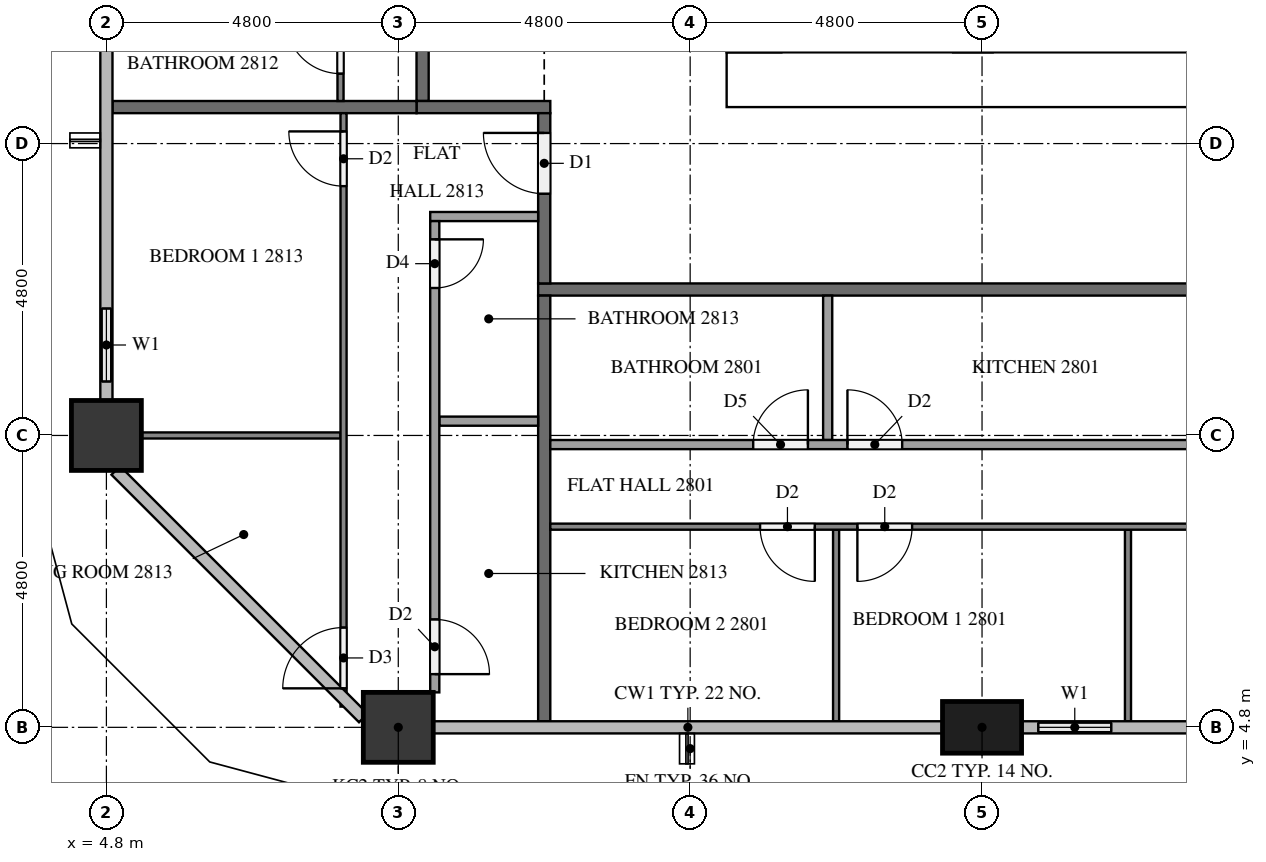
"""IFC4 building model, lengths in metres.
Left out: names, types, materials, properties, quantities, classifications, styles, units other than length and angle.
Written with IfcOpenShell. Run it as: python <this file> out.ifc"""

import sys

from ifc_helpers import new_model, si_unit, direction, frame, frame_2d, origin, origin_2d, place, context, subcontext, project, spatial, rectangle, extrude, element, fill, save


model = new_model("IFC4")
c1 = context("Model", 3, precision=1e-05, world=origin(), true_north=direction((0.0, 1.0)))
c2 = subcontext(c1, "Body", "Model", "MODEL_VIEW")
j1 = project(units=[si_unit("LENGTHUNIT", "METRE"), si_unit("PLANEANGLEUNIT", "RADIAN")], contexts=[c1])
p1 = place(None, origin())
s1 = spatial("IfcSite", under=j1, at=p1, CompositionType="ELEMENT")
p2 = place(p1, origin())
s2 = spatial("IfcBuilding", under=s1, at=p2, CompositionType="ELEMENT")
p3 = place(p2, frame((0.0, 0.0, 110.2)))
s3 = spatial("IfcBuildingStorey", under=s2, at=p3, CompositionType="ELEMENT", Elevation=110.2)
p4 = place(p3, frame((15.0, 15.45, 0.0), z_axis=(0.0, 0.0, 1.0), x_axis=(1.0, 0.0, 0.0)))
e1 = element("IfcWall", 1, at=p4, inside=s3, PredefinedType="SHEAR", context=c2, shape_type="SweptSolid", body=[
    extrude(rectangle(XDim=32.4, YDim=0.9, at=frame_2d((16.2, 0.0))), origin(), (0.0, 0.0, 1.0), 3.1),
])
p5 = place(p4, frame((15.3, 0.0, 0.0)))
e2 = element("IfcOpeningElement", 2, at=p5, cuts=e1, PredefinedType="OPENING", context=c2, shape_type="SweptSolid", body=[
    extrude(rectangle(XDim=1.8, YDim=2.1, at=frame_2d((0.9, 1.05))), frame((0.0, 0.46, 0.0), z_axis=(0.0, -1.0, 0.0), x_axis=(1.0, 0.0, 0.0)), (0.0, 0.0, 1.0), 0.92),
])
p6 = place(p3, frame((9.6, 4.8, 0.0), z_axis=(0.0, 0.0, 1.0), x_axis=(1.0, 0.0, 0.0)))
e3 = element("IfcColumn", 3, at=p6, inside=s3, PredefinedType="COLUMN", context=c2, shape_type="SweptSolid", body=[
    extrude(rectangle(XDim=1.15, YDim=1.15, at=origin_2d()), origin(), (0.0, 0.0, 1.0), 3.1),
])
p7 = place(p3, frame((19.2, 4.8, 0.0), z_axis=(0.0, 0.0, 1.0), x_axis=(1.0, 0.0, 0.0)))
e4 = element("IfcColumn", 4, at=p7, inside=s3, PredefinedType="COLUMN", context=c2, shape_type="SweptSolid", body=[
    extrude(rectangle(XDim=1.3, YDim=0.85, at=origin_2d()), origin(), (0.0, 0.0, 1.0), 3.1),
])
p8 = place(p3, frame((4.8, 9.6, 0.0), z_axis=(0.0, 0.0, 1.0), x_axis=(1.0, 0.0, 0.0)))
e5 = element("IfcColumn", 5, at=p8, inside=s3, PredefinedType="COLUMN", context=c2, shape_type="SweptSolid", body=[
    extrude(rectangle(XDim=1.15, YDim=1.15, at=origin_2d()), origin(), (0.0, 0.0, 1.0), 3.1),
])
p9 = place(p3, frame((19.85, 4.8, 0.0), z_axis=(0.0, 0.0, 1.0), x_axis=(1.0, 0.0, 0.0)))
e6 = element("IfcWall", 6, at=p9, inside=s3, PredefinedType="SOLIDWALL", context=c2, shape_type="SweptSolid", body=[
    extrude(rectangle(XDim=1.75, YDim=0.15, at=frame_2d((0.875, 0.0))), origin(), (0.0, 0.0, 1.0), 3.1),
])
p10 = place(p9, frame((0.275, 0.0, 0.9)))
e7 = element("IfcOpeningElement", 7, at=p10, cuts=e6, PredefinedType="OPENING", context=c2, shape_type="SweptSolid", body=[
    extrude(rectangle(XDim=1.2, YDim=1.4, at=frame_2d((0.6, 0.7))), frame((0.0, 0.085, 0.0), z_axis=(0.0, -1.0, 0.0), x_axis=(1.0, 0.0, 0.0)), (0.0, 0.0, 1.0), 0.17),
])
p11 = place(p3, frame((4.8, 12.0, 0.0), z_axis=(0.0, 0.0, 1.0), x_axis=(0.0, -1.0, 0.0)))
e8 = element("IfcWall", 8, at=p11, inside=s3, PredefinedType="SOLIDWALL", context=c2, shape_type="SweptSolid", body=[
    extrude(rectangle(XDim=1.825, YDim=0.15, at=frame_2d((0.913, 0.0))), origin(), (0.0, 0.0, 1.0), 3.1),
])
p12 = place(p11, frame((0.312, 0.0, 0.9)))
e9 = element("IfcOpeningElement", 9, at=p12, cuts=e8, PredefinedType="OPENING", context=c2, shape_type="SweptSolid", body=[
    extrude(rectangle(XDim=1.2, YDim=1.4, at=frame_2d((0.6, 0.7))), frame((0.0, 0.085, 0.0), z_axis=(0.0, -1.0, 0.0), x_axis=(1.0, 0.0, 0.0)), (0.0, 0.0, 1.0), 0.17),
])
p13 = place(p3, frame((50.5, 12.0, 0.0), z_axis=(0.0, 0.0, 1.0), x_axis=(-1.0, 0.0, 0.0)))
e10 = element("IfcWall", 10, at=p13, inside=s3, PredefinedType="PARTITIONING", context=c2, shape_type="SweptSolid", body=[
    extrude(rectangle(XDim=38.6, YDim=0.2, at=frame_2d((19.3, 0.0))), origin(), (0.0, 0.0, 1.0), 3.1),
])
p14 = place(p13, frame((22.125, 0.0, 0.0)))
e11 = element("IfcOpeningElement", 11, at=p14, cuts=e10, PredefinedType="OPENING", context=c2, shape_type="SweptSolid", body=[
    extrude(rectangle(XDim=1.0, YDim=2.1, at=frame_2d((0.5, 1.05))), frame((0.0, 0.11, 0.0), z_axis=(0.0, -1.0, 0.0), x_axis=(1.0, 0.0, 0.0)), (0.0, 0.0, 1.0), 0.22),
])
p15 = place(p13, frame((20.275, 0.0, 0.0)))
e12 = element("IfcOpeningElement", 12, at=p15, cuts=e10, PredefinedType="OPENING", context=c2, shape_type="SweptSolid", body=[
    extrude(rectangle(XDim=1.0, YDim=2.1, at=frame_2d((0.5, 1.05))), frame((0.0, 0.11, 0.0), z_axis=(0.0, -1.0, 0.0), x_axis=(1.0, 0.0, 0.0)), (0.0, 0.0, 1.0), 0.22),
])
p16 = place(p13, frame((0.525, 0.0, 0.0)))
e13 = element("IfcOpeningElement", 13, at=p16, cuts=e10, PredefinedType="OPENING", context=c2, shape_type="SweptSolid", body=[
    extrude(rectangle(XDim=1.0, YDim=2.1, at=frame_2d((0.5, 1.05))), frame((0.0, 0.11, 0.0), z_axis=(0.0, -1.0, 0.0), x_axis=(1.0, 0.0, 0.0)), (0.0, 0.0, 1.0), 0.22),
])
p17 = place(p3, frame((10.0, 15.1, 0.0), z_axis=(0.0, 0.0, 1.0), x_axis=(0.0, 1.0, 0.0)))
e14 = element("IfcWall", 14, at=p17, inside=s3, PredefinedType="PARTITIONING", context=c2, shape_type="SweptSolid", body=[
    extrude(rectangle(XDim=22.6, YDim=0.2, at=frame_2d((11.3, 0.0))), origin(), (0.0, 0.0, 1.0), 3.1),
])
p18 = place(p17, frame((21.275, 0.0, 0.0)))
e15 = element("IfcOpeningElement", 15, at=p18, cuts=e14, PredefinedType="OPENING", context=c2, shape_type="SweptSolid", body=[
    extrude(rectangle(XDim=1.0, YDim=2.1, at=frame_2d((0.5, 1.05))), frame((0.0, 0.11, 0.0), z_axis=(0.0, -1.0, 0.0), x_axis=(1.0, 0.0, 0.0)), (0.0, 0.0, 1.0), 0.22),
])
p19 = place(p3, frame((9.9, 15.0, 0.0), z_axis=(0.0, 0.0, 1.0), x_axis=(1.0, 0.0, 0.0)))
e16 = element("IfcWall", 16, at=p19, inside=s3, PredefinedType="PARTITIONING", context=c2, shape_type="SweptSolid", body=[
    extrude(rectangle(XDim=2.2, YDim=0.2, at=frame_2d((1.1, 0.0))), origin(), (0.0, 0.0, 1.0), 3.1),
])
p20 = place(p3, frame((12.0, 12.1, 0.0), z_axis=(0.0, 0.0, 1.0), x_axis=(0.0, 1.0, 0.0)))
e17 = element("IfcWall", 17, at=p20, inside=s3, PredefinedType="PARTITIONING", context=c2, shape_type="SweptSolid", body=[
    extrude(rectangle(XDim=2.8, YDim=0.2, at=frame_2d((1.4, 0.0))), origin(), (0.0, 0.0, 1.0), 3.1),
])
p21 = place(p20, frame((1.475, 0.0, 0.0)))
e18 = element("IfcOpeningElement", 18, at=p21, cuts=e17, PredefinedType="OPENING", context=c2, shape_type="SweptSolid", body=[
    extrude(rectangle(XDim=1.0, YDim=2.1, at=frame_2d((0.5, 1.05))), frame((0.0, 0.11, 0.0), z_axis=(0.0, -1.0, 0.0), x_axis=(1.0, 0.0, 0.0)), (0.0, 0.0, 1.0), 0.22),
])
p22 = place(p3, frame((12.0, 4.9, 0.0), z_axis=(0.0, 0.0, 1.0), x_axis=(0.0, 1.0, 0.0)))
e19 = element("IfcWall", 19, at=p22, inside=s3, PredefinedType="PARTITIONING", context=c2, shape_type="SweptSolid", body=[
    extrude(rectangle(XDim=7.0, YDim=0.2, at=frame_2d((3.5, 0.0))), origin(), (0.0, 0.0, 1.0), 3.1),
])
p23 = place(p3, frame((4.9, 15.0, 0.0), z_axis=(0.0, 0.0, 1.0), x_axis=(1.0, 0.0, 0.0)))
e20 = element("IfcWall", 20, at=p23, inside=s3, PredefinedType="PARTITIONING", context=c2, shape_type="SweptSolid", body=[
    extrude(rectangle(XDim=5.0, YDim=0.2, at=frame_2d((2.5, 0.0))), origin(), (0.0, 0.0, 1.0), 3.1),
])
for number, where, z_axis, x_axis in (
    (21, (21.6, 8.05, 0.0), (0.0, 0.0, 1.0), (0.0, -1.0, 0.0)),
    (22, (16.8, 8.05, 0.0), (0.0, 0.0, 1.0), (0.0, -1.0, 0.0)),
):
    element("IfcWall", number, at=place(p3, frame(where, z_axis=z_axis, x_axis=x_axis)), inside=s3, PredefinedType="PARTITIONING", context=c2, shape_type="SweptSolid", body=[
        extrude(rectangle(XDim=3.15, YDim=0.1, at=frame_2d((1.575, 0.0))), origin(), (0.0, 0.0, 1.0), 3.1),
    ])
p24 = place(p3, frame((28.7, 8.1, 0.0), z_axis=(0.0, 0.0, 1.0), x_axis=(-1.0, 0.0, 0.0)))
e23 = element("IfcWall", 23, at=p24, inside=s3, PredefinedType="PARTITIONING", context=c2, shape_type="SweptSolid", body=[
    extrude(rectangle(XDim=16.6, YDim=0.1, at=frame_2d((8.3, 0.0))), origin(), (0.0, 0.0, 1.0), 3.1),
])
p25 = place(p24, frame((0.3, 0.0, 0.0)))
e24 = element("IfcOpeningElement", 24, at=p25, cuts=e23, PredefinedType="OPENING", context=c2, shape_type="SweptSolid", body=[
    extrude(rectangle(XDim=1.0, YDim=2.1, at=frame_2d((0.5, 1.05))), frame((0.0, 0.06, 0.0), z_axis=(0.0, -1.0, 0.0), x_axis=(1.0, 0.0, 0.0)), (0.0, 0.0, 1.0), 0.12),
])
p26 = place(p24, frame((10.65, 0.0, 0.0)))
e25 = element("IfcOpeningElement", 25, at=p26, cuts=e23, PredefinedType="OPENING", context=c2, shape_type="SweptSolid", body=[
    extrude(rectangle(XDim=0.9, YDim=2.1, at=frame_2d((0.45, 1.05))), frame((0.0, 0.06, 0.0), z_axis=(0.0, -1.0, 0.0), x_axis=(1.0, 0.0, 0.0)), (0.0, 0.0, 1.0), 0.12),
])
p27 = place(p24, frame((12.25, 0.0, 0.0)))
e26 = element("IfcOpeningElement", 26, at=p27, cuts=e23, PredefinedType="OPENING", context=c2, shape_type="SweptSolid", body=[
    extrude(rectangle(XDim=0.9, YDim=2.1, at=frame_2d((0.45, 1.05))), frame((0.0, 0.06, 0.0), z_axis=(0.0, -1.0, 0.0), x_axis=(1.0, 0.0, 0.0)), (0.0, 0.0, 1.0), 0.12),
])
p28 = place(p3, frame((16.662, 11.9, 0.0), z_axis=(0.0, 0.0, 1.0), x_axis=(0.0, -1.0, 0.0)))
e27 = element("IfcWall", 27, at=p28, inside=s3, PredefinedType="PARTITIONING", context=c2, shape_type="SweptSolid", body=[
    extrude(rectangle(XDim=2.375, YDim=0.15, at=frame_2d((1.188, 0.0))), origin(), (0.0, 0.0, 1.0), 3.1),
])
p29 = place(p3, frame((12.1, 9.45, 0.0), z_axis=(0.0, 0.0, 1.0), x_axis=(1.0, 0.0, 0.0)))
e28 = element("IfcWall", 28, at=p29, inside=s3, PredefinedType="PARTITIONING", context=c2, shape_type="SweptSolid", body=[
    extrude(rectangle(XDim=14.825, YDim=0.15, at=frame_2d((7.413, 0.0))), origin(), (0.0, 0.0, 1.0), 3.1),
])
p30 = place(p29, frame((13.725, 0.0, 0.0)))
e29 = element("IfcOpeningElement", 29, at=p30, cuts=e28, PredefinedType="OPENING", context=c2, shape_type="SweptSolid", body=[
    extrude(rectangle(XDim=0.8, YDim=2.1, at=frame_2d((0.4, 1.05))), frame((0.0, 0.085, 0.0), z_axis=(0.0, -1.0, 0.0), x_axis=(1.0, 0.0, 0.0)), (0.0, 0.0, 1.0), 0.17),
])
p31 = place(p29, frame((4.886, 0.0, 0.0)))
e30 = element("IfcOpeningElement", 30, at=p31, cuts=e28, PredefinedType="OPENING", context=c2, shape_type="SweptSolid", body=[
    extrude(rectangle(XDim=0.9, YDim=2.1, at=frame_2d((0.45, 1.05))), frame((0.0, 0.085, 0.0), z_axis=(0.0, -1.0, 0.0), x_axis=(1.0, 0.0, 0.0)), (0.0, 0.0, 1.0), 0.17),
])
p32 = place(p29, frame((3.336, 0.0, 0.0)))
e31 = element("IfcOpeningElement", 31, at=p32, cuts=e28, PredefinedType="OPENING", context=c2, shape_type="SweptSolid", body=[
    extrude(rectangle(XDim=0.9, YDim=2.1, at=frame_2d((0.45, 1.05))), frame((0.0, 0.085, 0.0), z_axis=(0.0, -1.0, 0.0), x_axis=(1.0, 0.0, 0.0)), (0.0, 0.0, 1.0), 0.17),
])
p33 = place(p3, frame((8.65, 15.1, 0.0), z_axis=(0.0, 0.0, 1.0), x_axis=(0.0, 1.0, 0.0)))
e32 = element("IfcWall", 32, at=p33, inside=s3, PredefinedType="PARTITIONING", context=c2, shape_type="SweptSolid", body=[
    extrude(rectangle(XDim=22.6, YDim=0.1, at=frame_2d((11.3, 0.0))), origin(), (0.0, 0.0, 1.0), 3.1),
])
p34 = place(p33, frame((16.45, 0.0, 0.0)))
e33 = element("IfcOpeningElement", 33, at=p34, cuts=e32, PredefinedType="OPENING", context=c2, shape_type="SweptSolid", body=[
    extrude(rectangle(XDim=1.0, YDim=2.1, at=frame_2d((0.5, 1.05))), frame((0.0, 0.06, 0.0), z_axis=(0.0, -1.0, 0.0), x_axis=(1.0, 0.0, 0.0)), (0.0, 0.0, 1.0), 0.12),
])
p35 = place(p33, frame((14.85, 0.0, 0.0)))
e34 = element("IfcOpeningElement", 34, at=p35, cuts=e32, PredefinedType="OPENING", context=c2, shape_type="SweptSolid", body=[
    extrude(rectangle(XDim=0.9, YDim=2.1, at=frame_2d((0.45, 1.05))), frame((0.0, 0.06, 0.0), z_axis=(0.0, -1.0, 0.0), x_axis=(1.0, 0.0, 0.0)), (0.0, 0.0, 1.0), 0.12),
])
p36 = place(p33, frame((11.65, 0.0, 0.0)))
e35 = element("IfcOpeningElement", 35, at=p36, cuts=e32, PredefinedType="OPENING", context=c2, shape_type="SweptSolid", body=[
    extrude(rectangle(XDim=0.8, YDim=2.1, at=frame_2d((0.4, 1.05))), frame((0.0, 0.06, 0.0), z_axis=(0.0, -1.0, 0.0), x_axis=(1.0, 0.0, 0.0)), (0.0, 0.0, 1.0), 0.12),
])
p37 = place(p33, frame((10.05, 0.0, 0.0)))
e36 = element("IfcOpeningElement", 36, at=p37, cuts=e32, PredefinedType="OPENING", context=c2, shape_type="SweptSolid", body=[
    extrude(rectangle(XDim=0.9, YDim=2.1, at=frame_2d((0.45, 1.05))), frame((0.0, 0.06, 0.0), z_axis=(0.0, -1.0, 0.0), x_axis=(1.0, 0.0, 0.0)), (0.0, 0.0, 1.0), 0.12),
])
p38 = place(p33, frame((2.05, 0.0, 0.0)))
e37 = element("IfcOpeningElement", 37, at=p38, cuts=e32, PredefinedType="OPENING", context=c2, shape_type="SweptSolid", body=[
    extrude(rectangle(XDim=0.9, YDim=2.1, at=frame_2d((0.45, 1.05))), frame((0.0, 0.06, 0.0), z_axis=(0.0, -1.0, 0.0), x_axis=(1.0, 0.0, 0.0)), (0.0, 0.0, 1.0), 0.12),
])
p39 = place(p33, frame((0.45, 0.0, 0.0)))
e38 = element("IfcOpeningElement", 38, at=p39, cuts=e32, PredefinedType="OPENING", context=c2, shape_type="SweptSolid", body=[
    extrude(rectangle(XDim=0.9, YDim=2.1, at=frame_2d((0.45, 1.05))), frame((0.0, 0.06, 0.0), z_axis=(0.0, -1.0, 0.0), x_axis=(1.0, 0.0, 0.0)), (0.0, 0.0, 1.0), 0.12),
])
p40 = place(p3, frame((8.65, 9.6, 0.0), z_axis=(0.0, 0.0, 1.0), x_axis=(-1.0, 0.0, 0.0)))
e39 = element("IfcWall", 39, at=p40, inside=s3, PredefinedType="PARTITIONING", context=c2, shape_type="SweptSolid", body=[
    extrude(rectangle(XDim=3.275, YDim=0.1, at=frame_2d((1.637, 0.0))), origin(), (0.0, 0.0, 1.0), 3.1),
])
p41 = place(p3, frame((8.7, 5.141, 0.0), z_axis=(0.0, 0.0, 1.0), x_axis=(0.0, 1.0, 0.0)))
e40 = element("IfcWall", 40, at=p41, inside=s3, PredefinedType="PARTITIONING", context=c2, shape_type="SweptSolid", body=[
    extrude(rectangle(XDim=9.759, YDim=0.1, at=frame_2d((4.879, 0.0))), origin(), (0.0, 0.0, 1.0), 3.1),
])
p42 = place(p41, frame((8.559, 0.0, 0.0)))
e41 = element("IfcOpeningElement", 41, at=p42, cuts=e40, PredefinedType="OPENING", context=c2, shape_type="SweptSolid", body=[
    extrude(rectangle(XDim=0.9, YDim=2.1, at=frame_2d((0.45, 1.05))), frame((0.0, 0.06, 0.0), z_axis=(0.0, -1.0, 0.0), x_axis=(1.0, 0.0, 0.0)), (0.0, 0.0, 1.0), 0.12),
])
p43 = place(p41, frame((0.3, 0.0, 0.0)))
e42 = element("IfcOpeningElement", 42, at=p43, cuts=e40, PredefinedType="OPENING", context=c2, shape_type="SweptSolid", body=[
    extrude(rectangle(XDim=1.0, YDim=2.1, at=frame_2d((0.5, 1.05))), frame((0.0, 0.06, 0.0), z_axis=(0.0, -1.0, 0.0), x_axis=(1.0, 0.0, 0.0)), (0.0, 0.0, 1.0), 0.12),
])
p44 = place(p3, frame((11.9, 9.835, 0.0), z_axis=(0.0, 0.0, 1.0), x_axis=(-1.0, 0.0, 0.0)))
e43 = element("IfcWall", 43, at=p44, inside=s3, PredefinedType="PARTITIONING", context=c2, shape_type="SweptSolid", body=[
    extrude(rectangle(XDim=1.625, YDim=0.15, at=frame_2d((0.812, 0.0))), origin(), (0.0, 0.0, 1.0), 3.1),
])
p45 = place(p3, frame((11.9, 13.2, 0.0), z_axis=(0.0, 0.0, 1.0), x_axis=(-1.0, 0.0, 0.0)))
e44 = element("IfcWall", 44, at=p45, inside=s3, PredefinedType="PARTITIONING", context=c2, shape_type="SweptSolid", body=[
    extrude(rectangle(XDim=1.775, YDim=0.15, at=frame_2d((0.887, 0.0))), origin(), (0.0, 0.0, 1.0), 3.1),
])
p46 = place(p3, frame((10.2, 13.125, 0.0), z_axis=(0.0, 0.0, 1.0), x_axis=(0.0, -1.0, 0.0)))
e45 = element("IfcWall", 45, at=p46, inside=s3, PredefinedType="PARTITIONING", context=c2, shape_type="SweptSolid", body=[
    extrude(rectangle(XDim=7.75, YDim=0.15, at=frame_2d((3.875, 0.0))), origin(), (0.0, 0.0, 1.0), 3.1),
])
p47 = place(p46, frame((0.3, 0.0, 0.0)))
e46 = element("IfcOpeningElement", 46, at=p47, cuts=e45, PredefinedType="OPENING", context=c2, shape_type="SweptSolid", body=[
    extrude(rectangle(XDim=0.8, YDim=2.1, at=frame_2d((0.4, 1.05))), frame((0.0, 0.085, 0.0), z_axis=(0.0, -1.0, 0.0), x_axis=(1.0, 0.0, 0.0)), (0.0, 0.0, 1.0), 0.17),
])
p48 = place(p46, frame((6.55, 0.0, 0.0)))
e47 = element("IfcOpeningElement", 47, at=p48, cuts=e45, PredefinedType="OPENING", context=c2, shape_type="SweptSolid", body=[
    extrude(rectangle(XDim=0.9, YDim=2.1, at=frame_2d((0.45, 1.05))), frame((0.0, 0.085, 0.0), z_axis=(0.0, -1.0, 0.0), x_axis=(1.0, 0.0, 0.0)), (0.0, 0.0, 1.0), 0.17),
])
p49 = place(p10, origin())
e48 = element("IfcWindow", 48, at=p49, inside=s3, PartitioningType="SINGLE_PANEL", PredefinedType="WINDOW", context=c2, shape_type="SweptSolid", body=[
    extrude(rectangle(XDim=1.2, YDim=1.4, at=frame_2d((0.6, 0.7))), frame((0.0, 0.03, 0.0), z_axis=(0.0, -1.0, 0.0), x_axis=(1.0, 0.0, 0.0)), (0.0, 0.0, 1.0), 0.06),
])
fill(e7, e48)
p50 = place(p12, origin())
e49 = element("IfcWindow", 49, at=p50, inside=s3, PartitioningType="SINGLE_PANEL", PredefinedType="WINDOW", context=c2, shape_type="SweptSolid", body=[
    extrude(rectangle(XDim=1.2, YDim=1.4, at=frame_2d((0.6, 0.7))), frame((0.0, 0.03, 0.0), z_axis=(0.0, -1.0, 0.0), x_axis=(1.0, 0.0, 0.0)), (0.0, 0.0, 1.0), 0.06),
])
fill(e9, e49)
p51 = place(p21, origin())
e50 = element("IfcDoor", 50, at=p51, inside=s3, OperationType="SINGLE_SWING_RIGHT", PredefinedType="DOOR", context=c2, shape_type="SweptSolid", body=[
    extrude(rectangle(XDim=1.0, YDim=2.1, at=frame_2d((0.5, 1.05))), frame((0.0, 0.025, 0.0), z_axis=(0.0, -1.0, 0.0), x_axis=(1.0, 0.0, 0.0)), (0.0, 0.0, 1.0), 0.05),
])
fill(e18, e50)
p52 = place(p26, origin())
e51 = element("IfcDoor", 51, at=p52, inside=s3, OperationType="SINGLE_SWING_RIGHT", PredefinedType="DOOR", context=c2, shape_type="SweptSolid", body=[
    extrude(rectangle(XDim=0.9, YDim=2.1, at=frame_2d((0.45, 1.05))), frame((0.0, 0.025, 0.0), z_axis=(0.0, -1.0, 0.0), x_axis=(1.0, 0.0, 0.0)), (0.0, 0.0, 1.0), 0.05),
])
fill(e25, e51)
p53 = place(p27, origin())
e52 = element("IfcDoor", 52, at=p53, inside=s3, OperationType="SINGLE_SWING_LEFT", PredefinedType="DOOR", context=c2, shape_type="SweptSolid", body=[
    extrude(rectangle(XDim=0.9, YDim=2.1, at=frame_2d((0.45, 1.05))), frame((0.0, 0.025, 0.0), z_axis=(0.0, -1.0, 0.0), x_axis=(1.0, 0.0, 0.0)), (0.0, 0.0, 1.0), 0.05),
])
fill(e26, e52)
p54 = place(p31, origin())
e53 = element("IfcDoor", 53, at=p54, inside=s3, OperationType="SINGLE_SWING_LEFT", PredefinedType="DOOR", context=c2, shape_type="SweptSolid", body=[
    extrude(rectangle(XDim=0.9, YDim=2.1, at=frame_2d((0.45, 1.05))), frame((0.0, 0.025, 0.0), z_axis=(0.0, -1.0, 0.0), x_axis=(1.0, 0.0, 0.0)), (0.0, 0.0, 1.0), 0.05),
])
fill(e30, e53)
p55 = place(p32, origin())
e54 = element("IfcDoor", 54, at=p55, inside=s3, OperationType="SINGLE_SWING_RIGHT", PredefinedType="DOOR", context=c2, shape_type="SweptSolid", body=[
    extrude(rectangle(XDim=0.9, YDim=2.1, at=frame_2d((0.45, 1.05))), frame((0.0, 0.025, 0.0), z_axis=(0.0, -1.0, 0.0), x_axis=(1.0, 0.0, 0.0)), (0.0, 0.0, 1.0), 0.05),
])
fill(e31, e54)
p56 = place(p39, origin())
e55 = element("IfcDoor", 55, at=p56, inside=s3, OperationType="SINGLE_SWING_RIGHT", PredefinedType="DOOR", context=c2, shape_type="SweptSolid", body=[
    extrude(rectangle(XDim=0.9, YDim=2.1, at=frame_2d((0.45, 1.05))), frame((0.0, 0.025, 0.0), z_axis=(0.0, -1.0, 0.0), x_axis=(1.0, 0.0, 0.0)), (0.0, 0.0, 1.0), 0.05),
])
fill(e38, e55)
p57 = place(p42, origin())
e56 = element("IfcDoor", 56, at=p57, inside=s3, OperationType="SINGLE_SWING_RIGHT", PredefinedType="DOOR", context=c2, shape_type="SweptSolid", body=[
    extrude(rectangle(XDim=0.9, YDim=2.1, at=frame_2d((0.45, 1.05))), frame((0.0, 0.025, 0.0), z_axis=(0.0, -1.0, 0.0), x_axis=(1.0, 0.0, 0.0)), (0.0, 0.0, 1.0), 0.05),
])
fill(e41, e56)
p58 = place(p43, origin())
e57 = element("IfcDoor", 57, at=p58, inside=s3, OperationType="SINGLE_SWING_LEFT", PredefinedType="DOOR", context=c2, shape_type="SweptSolid", body=[
    extrude(rectangle(XDim=1.0, YDim=2.1, at=frame_2d((0.5, 1.05))), frame((0.0, 0.025, 0.0), z_axis=(0.0, -1.0, 0.0), x_axis=(1.0, 0.0, 0.0)), (0.0, 0.0, 1.0), 0.05),
])
fill(e42, e57)
p59 = place(p47, origin())
e58 = element("IfcDoor", 58, at=p59, inside=s3, OperationType="SINGLE_SWING_LEFT", PredefinedType="DOOR", context=c2, shape_type="SweptSolid", body=[
    extrude(rectangle(XDim=0.8, YDim=2.1, at=frame_2d((0.4, 1.05))), frame((0.0, 0.025, 0.0), z_axis=(0.0, -1.0, 0.0), x_axis=(1.0, 0.0, 0.0)), (0.0, 0.0, 1.0), 0.05),
])
fill(e46, e58)
p60 = place(p48, origin())
e59 = element("IfcDoor", 59, at=p60, inside=s3, OperationType="SINGLE_SWING_RIGHT", PredefinedType="DOOR", context=c2, shape_type="SweptSolid", body=[
    extrude(rectangle(XDim=0.9, YDim=2.1, at=frame_2d((0.45, 1.05))), frame((0.0, 0.025, 0.0), z_axis=(0.0, -1.0, 0.0), x_axis=(1.0, 0.0, 0.0)), (0.0, 0.0, 1.0), 0.05),
])
fill(e47, e59)
save(model, sys.argv[1])
